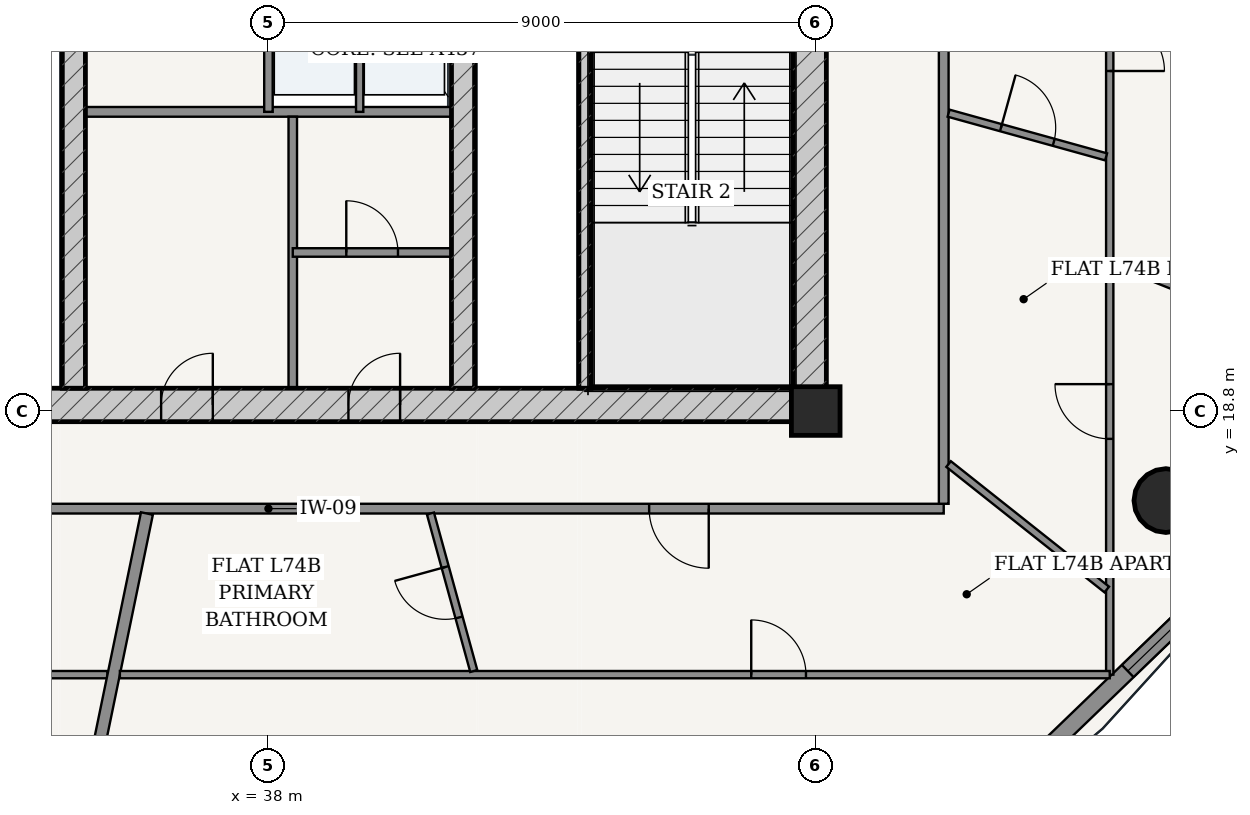
"""IFC4 building model, lengths in metres.
Left out: names, types, materials, properties, quantities, classifications, styles, units other than length and angle.
Written with IfcOpenShell. Run it as: python <this file> out.ifc"""

import sys

from ifc_helpers import new_model, si_unit, direction, frame, frame_2d, origin, origin_2d, place, context, subcontext, project, spatial, rectangle, hollow_circle, extrude, source, transform, mapped, element, fill, save


model = new_model("IFC4")
c1 = context("Model", 3, precision=1e-05, world=origin(), true_north=direction((-0.2419218956, 0.970295726276)))
c2 = subcontext(c1, "Body", "Model", "MODEL_VIEW")
j1 = project(units=[si_unit("LENGTHUNIT", "METRE"), si_unit("PLANEANGLEUNIT", "RADIAN")], contexts=[c1])
p1 = place(None, origin())
s1 = spatial("IfcSite", under=j1, at=p1, CompositionType="ELEMENT")
p2 = place(p1, origin())
s2 = spatial("IfcBuilding", under=s1, at=p2, CompositionType="ELEMENT")
p3 = place(p2, frame((0.0, 0.0, 281.95)))
s3 = spatial("IfcBuildingStorey", under=s2, at=p3, CompositionType="ELEMENT", Elevation=281.95)
p4 = place(p3, frame((47.0, 18.8, 0.0), z_axis=(0.0, 0.0, 1.0), x_axis=(1.0, 0.0, 0.0)))
e1 = element("IfcColumn", 1, at=p4, inside=s3, PredefinedType="COLUMN", context=c2, shape_type="SweptSolid", body=[
    extrude(rectangle(XDim=0.8, YDim=0.8, at=origin_2d()), origin(), (0.0, 0.0, 1.0), 3.75),
])
p5 = place(p3, frame((28.825, 18.9, 0.0), z_axis=(0.0, 0.0, 1.0), x_axis=(1.0, 0.0, 0.0)))
e2 = element("IfcWall", 2, at=p5, inside=s3, PredefinedType="SHEAR", context=c2, shape_type="SweptSolid", body=[
    extrude(rectangle(XDim=18.35, YDim=0.55, at=frame_2d((9.175, 0.0))), origin(), (0.0, 0.0, 1.0), 3.49),
])
p6 = place(p5, frame((7.41, 0.0, 0.0)))
e3 = element("IfcOpeningElement", 3, at=p6, cuts=e2, PredefinedType="OPENING", context=c2, shape_type="SweptSolid", body=[
    extrude(rectangle(XDim=0.85, YDim=2.1, at=frame_2d((0.425, 1.05))), frame((0.0, 0.285, 0.0), z_axis=(0.0, -1.0, 0.0), x_axis=(1.0, 0.0, 0.0)), (0.0, 0.0, 1.0), 0.57),
])
p7 = place(p5, frame((10.49, 0.0, 0.0)))
e4 = element("IfcOpeningElement", 4, at=p7, cuts=e2, PredefinedType="OPENING", context=c2, shape_type="SweptSolid", body=[
    extrude(rectangle(XDim=0.85, YDim=2.1, at=frame_2d((0.425, 1.05))), frame((0.0, 0.285, 0.0), z_axis=(0.0, -1.0, 0.0), x_axis=(1.0, 0.0, 0.0)), (0.0, 0.0, 1.0), 0.57),
])
p8 = place(p3, frame((46.9, 19.175, 0.0), z_axis=(0.0, 0.0, 1.0), x_axis=(0.0, 1.0, 0.0)))
e5 = element("IfcWall", 5, at=p8, inside=s3, PredefinedType="SHEAR", context=c2, shape_type="SweptSolid", body=[
    extrude(rectangle(XDim=15.25, YDim=0.55, at=frame_2d((7.625, 0.0))), origin(), (0.0, 0.0, 1.0), 3.49),
])
p9 = place(p8, frame((9.875, 0.0, 0.0)))
e6 = element("IfcOpeningElement", 6, at=p9, cuts=e5, PredefinedType="OPENING", context=c2, shape_type="SweptSolid", body=[
    extrude(rectangle(XDim=1.5, YDim=2.2, at=frame_2d((0.75, 1.1))), frame((0.0, 0.285, 0.0), z_axis=(0.0, -1.0, 0.0), x_axis=(1.0, 0.0, 0.0)), (0.0, 0.0, 1.0), 0.57),
])
p10 = place(p3, frame((43.205, 19.175, 0.0), z_axis=(0.0, 0.0, 1.0), x_axis=(0.0, 1.0, 0.0)))
e7 = element("IfcWall", 7, at=p10, inside=s3, PredefinedType="SOLIDWALL", context=c2, shape_type="SweptSolid", body=[
    extrude(rectangle(XDim=7.375, YDim=0.2, at=frame_2d((3.688, 0.0))), origin(), (0.0, 0.0, 1.0), 3.49),
])
p11 = place(p3, frame((34.8, 19.175, 0.0), z_axis=(0.0, 0.0, 1.0), x_axis=(0.0, 1.0, 0.0)))
e8 = element("IfcWall", 8, at=p11, inside=s3, PredefinedType="SHEAR", context=c2, shape_type="SweptSolid", body=[
    extrude(rectangle(XDim=15.25, YDim=0.38, at=frame_2d((7.625, 0.0))), origin(), (0.0, 0.0, 1.0), 3.49),
])
p12 = place(p11, frame((7.8, 0.0, 0.0)))
e9 = element("IfcOpeningElement", 9, at=p12, cuts=e8, PredefinedType="OPENING", context=c2, shape_type="SweptSolid", body=[
    extrude(rectangle(XDim=1.05, YDim=2.15, at=frame_2d((0.525, 1.075))), frame((0.0, 0.2, 0.0), z_axis=(0.0, -1.0, 0.0), x_axis=(1.0, 0.0, 0.0)), (0.0, 0.0, 1.0), 0.4),
])
p13 = place(p3, frame((41.2, 19.175, 0.0), z_axis=(0.0, 0.0, 1.0), x_axis=(0.0, 1.0, 0.0)))
e10 = element("IfcWall", 10, at=p13, inside=s3, PredefinedType="SHEAR", context=c2, shape_type="SweptSolid", body=[
    extrude(rectangle(XDim=15.25, YDim=0.38, at=frame_2d((7.625, 0.0))), origin(), (0.0, 0.0, 1.0), 3.49),
])
p14 = place(p13, frame((7.8, 0.0, 0.0)))
e11 = element("IfcOpeningElement", 11, at=p14, cuts=e10, PredefinedType="OPENING", context=c2, shape_type="SweptSolid", body=[
    extrude(rectangle(XDim=1.05, YDim=2.15, at=frame_2d((0.525, 1.075))), frame((0.0, 0.2, 0.0), z_axis=(0.0, -1.0, 0.0), x_axis=(1.0, 0.0, 0.0)), (0.0, 0.0, 1.0), 0.4),
])
p15 = place(p3, frame((52.759, 17.328, 0.0), z_axis=(0.0, 0.0, 1.0), x_axis=(1.0, 0.0, 0.0)))
e12 = element("IfcColumn", 12, at=p15, inside=s3, PredefinedType="COLUMN", context=c2, shape_type="SweptSolid", body=[
    extrude(hollow_circle(Radius=0.525, WallThickness=0.035, at=origin_2d()), origin(), (0.0, 0.0, 1.0), 3.75),
])
p16 = place(p3, frame((48.704, 11.221, 0.0), z_axis=(0.0, 0.0, 1.0), x_axis=(0.719995397366, 0.69397883813, 0.0)))
e13 = element("IfcWall", 13, at=p16, inside=s3, PredefinedType="SOLIDWALL", context=c2, shape_type="SweptSolid", body=[
    extrude(rectangle(XDim=7.582, YDim=0.28, at=frame_2d((3.791, 0.0))), origin(), (0.0, 0.0, 1.0), 3.49),
])
p17 = place(p16, frame((1.272, 0.0, 0.85)))
e14 = element("IfcOpeningElement", 14, at=p17, cuts=e13, PredefinedType="OPENING", context=c2, shape_type="SweptSolid", body=[
    extrude(rectangle(XDim=1.55, YDim=1.95, at=frame_2d((0.775, 0.975))), frame((0.0, 0.15, 0.0), z_axis=(0.0, -1.0, 0.0), x_axis=(1.0, 0.0, 0.0)), (0.0, 0.0, 1.0), 0.3),
])
p18 = place(p16, frame((4.76, 0.0, 0.85)))
e15 = element("IfcOpeningElement", 15, at=p18, cuts=e13, PredefinedType="OPENING", context=c2, shape_type="SweptSolid", body=[
    extrude(rectangle(XDim=1.55, YDim=1.95, at=frame_2d((0.775, 0.975))), frame((0.0, 0.15, 0.0), z_axis=(0.0, -1.0, 0.0), x_axis=(1.0, 0.0, 0.0)), (0.0, 0.0, 1.0), 0.3),
])
p19 = place(p3, frame((34.99, 23.72, 0.0), z_axis=(0.0, 0.0, 1.0), x_axis=(1.0, 0.0, 0.0)))
e16 = element("IfcWall", 16, at=p19, inside=s3, PredefinedType="PARTITIONING", context=c2, shape_type="SweptSolid", body=[
    extrude(rectangle(XDim=6.02, YDim=0.16, at=frame_2d((3.01, 0.0))), origin(), (0.0, 0.0, 1.0), 3.49),
])
p20 = place(p3, frame((38.0, 23.72, 0.0), z_axis=(0.0, 0.0, 1.0), x_axis=(0.0, 1.0, 0.0)))
e17 = element("IfcWall", 17, at=p20, inside=s3, PredefinedType="PARTITIONING", context=c2, shape_type="SweptSolid", body=[
    extrude(rectangle(XDim=2.56, YDim=0.14, at=frame_2d((1.28, 0.0))), origin(), (0.0, 0.0, 1.0), 3.49),
])
p21 = place(p3, frame((39.5, 23.72, 0.0), z_axis=(0.0, 0.0, 1.0), x_axis=(0.0, 1.0, 0.0)))
e18 = element("IfcWall", 18, at=p21, inside=s3, PredefinedType="PARTITIONING", context=c2, shape_type="SweptSolid", body=[
    extrude(rectangle(XDim=2.56, YDim=0.12, at=frame_2d((1.28, 0.0))), origin(), (0.0, 0.0, 1.0), 3.49),
])
p22 = place(p3, frame((38.4, 19.175, 0.0), z_axis=(0.0, 0.0, 1.0), x_axis=(0.0, 1.0, 0.0)))
e19 = element("IfcWall", 19, at=p22, inside=s3, PredefinedType="PARTITIONING", context=c2, shape_type="SweptSolid", body=[
    extrude(rectangle(XDim=4.465, YDim=0.14, at=frame_2d((2.232, 0.0))), origin(), (0.0, 0.0, 1.0), 3.49),
])
p23 = place(p3, frame((38.4, 21.407, 0.0), z_axis=(0.0, 0.0, 1.0), x_axis=(1.0, 0.0, 0.0)))
e20 = element("IfcWall", 20, at=p23, inside=s3, PredefinedType="PARTITIONING", context=c2, shape_type="SweptSolid", body=[
    extrude(rectangle(XDim=2.61, YDim=0.14, at=frame_2d((1.305, 0.0))), origin(), (0.0, 0.0, 1.0), 3.49),
])
p24 = place(p23, frame((0.88, 0.0, 0.0)))
e21 = element("IfcOpeningElement", 21, at=p24, cuts=e20, PredefinedType="OPENING", context=c2, shape_type="SweptSolid", body=[
    extrude(rectangle(XDim=0.85, YDim=2.1, at=frame_2d((0.425, 1.05))), frame((0.0, 0.08, 0.0), z_axis=(0.0, -1.0, 0.0), x_axis=(1.0, 0.0, 0.0)), (0.0, 0.0, 1.0), 0.16),
])
p25 = place(p3, frame((26.895, 17.195, 0.0), z_axis=(0.0, 0.0, 1.0), x_axis=(1.0, 0.0, 0.0)))
e22 = element("IfcWall", 22, at=p25, inside=s3, PredefinedType="PARTITIONING", context=c2, shape_type="SweptSolid", body=[
    extrude(rectangle(XDim=22.21, YDim=0.16, at=frame_2d((11.105, 0.0))), origin(), (0.0, 0.0, 1.0), 3.015),
])
p26 = place(p25, frame((17.365, 0.0, 0.0)))
e23 = element("IfcOpeningElement", 23, at=p26, cuts=e22, PredefinedType="OPENING", context=c2, shape_type="SweptSolid", body=[
    extrude(rectangle(XDim=0.98, YDim=2.2, at=frame_2d((0.49, 1.1))), frame((0.0, 0.09, 0.0), z_axis=(0.0, -1.0, 0.0), x_axis=(1.0, 0.0, 0.0)), (0.0, 0.0, 1.0), 0.18),
])
p27 = place(p3, frame((49.105, 17.275, 0.0), z_axis=(0.0, 0.0, 1.0), x_axis=(0.0, 1.0, 0.0)))
e24 = element("IfcWall", 24, at=p27, inside=s3, PredefinedType="PARTITIONING", context=c2, shape_type="SweptSolid", body=[
    extrude(rectangle(XDim=13.925, YDim=0.16, at=frame_2d((6.962, 0.0))), origin(), (0.0, 0.0, 1.0), 3.015),
])
p28 = place(p3, frame((35.353, 14.465, 0.0), z_axis=(0.0, 0.0, 1.0), x_axis=(-1.0, 0.0, 0.0)))
e25 = element("IfcWall", 25, at=p28, inside=s3, PredefinedType="PARTITIONING", context=c2, shape_type="SweptSolid", body=[
    extrude(rectangle(XDim=11.188, YDim=0.12, at=frame_2d((5.594, 0.0))), origin(), (0.0, 0.0, 1.0), 3.015),
])
p29 = place(p28, frame((3.997, 0.0, 0.0)))
e26 = element("IfcOpeningElement", 26, at=p29, cuts=e25, PredefinedType="OPENING", context=c2, shape_type="SweptSolid", body=[
    extrude(rectangle(XDim=0.9, YDim=2.15, at=frame_2d((0.45, 1.075))), frame((0.0, 0.07, 0.0), z_axis=(0.0, -1.0, 0.0), x_axis=(1.0, 0.0, 0.0)), (0.0, 0.0, 1.0), 0.14),
])
p30 = place(p3, frame((36.001, 17.115, 0.0), z_axis=(0.0, 0.0, 1.0), x_axis=(-0.202108543081, -0.979363128167, 0.0)))
e27 = element("IfcWall", 27, at=p30, inside=s3, PredefinedType="PARTITIONING", context=c2, shape_type="SweptSolid", body=[
    extrude(rectangle(XDim=8.739, YDim=0.2, at=frame_2d((4.369, 0.0))), origin(), (0.0, 0.0, 1.0), 3.015),
])
p31 = place(p3, frame((51.835, 34.01, 0.0), z_axis=(0.0, 0.0, 1.0), x_axis=(0.0, -1.0, 0.0)))
e28 = element("IfcWall", 28, at=p31, inside=s3, PredefinedType="PARTITIONING", context=c2, shape_type="SweptSolid", body=[
    extrude(rectangle(XDim=19.545, YDim=0.12, at=frame_2d((9.772, 0.0))), origin(), (0.0, 0.0, 1.0), 3.015),
])
p32 = place(p31, frame((14.768, 0.0, 0.0)))
e29 = element("IfcOpeningElement", 29, at=p32, cuts=e28, PredefinedType="OPENING", context=c2, shape_type="SweptSolid", body=[
    extrude(rectangle(XDim=0.9, YDim=2.15, at=frame_2d((0.45, 1.075))), frame((0.0, 0.07, 0.0), z_axis=(0.0, -1.0, 0.0), x_axis=(1.0, 0.0, 0.0)), (0.0, 0.0, 1.0), 0.14),
])
p33 = place(p31, frame((8.718, 0.0, 0.0)))
e30 = element("IfcOpeningElement", 30, at=p33, cuts=e28, PredefinedType="OPENING", context=c2, shape_type="SweptSolid", body=[
    extrude(rectangle(XDim=0.9, YDim=2.15, at=frame_2d((0.45, 1.075))), frame((0.0, 0.07, 0.0), z_axis=(0.0, -1.0, 0.0), x_axis=(1.0, 0.0, 0.0)), (0.0, 0.0, 1.0), 0.14),
])
p34 = place(p31, frame((4.14, 0.0, 0.0)))
e31 = element("IfcOpeningElement", 31, at=p34, cuts=e28, PredefinedType="OPENING", context=c2, shape_type="SweptSolid", body=[
    extrude(rectangle(XDim=0.9, YDim=2.15, at=frame_2d((0.45, 1.075))), frame((0.0, 0.07, 0.0), z_axis=(0.0, -1.0, 0.0), x_axis=(1.0, 0.0, 0.0)), (0.0, 0.0, 1.0), 0.14),
])
p35 = place(p3, frame((51.835, 14.465, 0.0), z_axis=(0.0, 0.0, 1.0), x_axis=(-1.0, 0.0, 0.0)))
e32 = element("IfcWall", 32, at=p35, inside=s3, PredefinedType="PARTITIONING", context=c2, shape_type="SweptSolid", body=[
    extrude(rectangle(XDim=16.278, YDim=0.12, at=frame_2d((8.139, 0.0))), origin(), (0.0, 0.0, 1.0), 3.015),
])
p36 = place(p35, frame((4.996, 0.0, 0.0)))
e33 = element("IfcOpeningElement", 33, at=p36, cuts=e32, PredefinedType="OPENING", context=c2, shape_type="SweptSolid", body=[
    extrude(rectangle(XDim=0.9, YDim=2.15, at=frame_2d((0.45, 1.075))), frame((0.0, 0.07, 0.0), z_axis=(0.0, -1.0, 0.0), x_axis=(1.0, 0.0, 0.0)), (0.0, 0.0, 1.0), 0.14),
])
p37 = place(p3, frame((51.893, 21.253, 0.0), z_axis=(0.0, 0.0, 1.0), x_axis=(0.928712556691, -0.370800467966, 0.0)))
e34 = element("IfcWall", 34, at=p37, inside=s3, PredefinedType="PARTITIONING", context=c2, shape_type="SweptSolid", body=[
    extrude(rectangle(XDim=4.28, YDim=0.12, at=frame_2d((2.14, 0.0))), origin(), (0.0, 0.0, 1.0), 3.121),
])
p38 = place(p3, frame((40.664, 17.115, 0.0), z_axis=(0.0, 0.0, 1.0), x_axis=(0.265177604745, -0.964199584081, 0.0)))
e35 = element("IfcWall", 35, at=p38, inside=s3, PredefinedType="PARTITIONING", context=c2, shape_type="SweptSolid", body=[
    extrude(rectangle(XDim=2.687, YDim=0.12, at=frame_2d((1.343, 0.0))), origin(), (0.0, 0.0, 1.0), 3.209),
])
p39 = place(p38, frame((0.913, 0.0, 0.0)))
e36 = element("IfcOpeningElement", 36, at=p39, cuts=e35, PredefinedType="OPENING", context=c2, shape_type="SweptSolid", body=[
    extrude(rectangle(XDim=0.86, YDim=2.15, at=frame_2d((0.43, 1.075))), frame((0.0, 0.07, 0.0), z_axis=(0.0, -1.0, 0.0), x_axis=(1.0, 0.0, 0.0)), (0.0, 0.0, 1.0), 0.14),
])
p40 = place(p3, frame((49.185, 17.928, 0.0), z_axis=(0.0, 0.0, 1.0), x_axis=(0.78348039615, -0.621416501912, 0.0)))
e37 = element("IfcWall", 37, at=p40, inside=s3, PredefinedType="PARTITIONING", context=c2, shape_type="SweptSolid", body=[
    extrude(rectangle(XDim=3.32, YDim=0.12, at=frame_2d((1.66, 0.0))), origin(), (0.0, 0.0, 1.0), 3.121),
])
p41 = place(p3, frame((49.185, 23.698, 0.0), z_axis=(0.0, 0.0, 1.0), x_axis=(0.963633636359, -0.267226897744, 0.0)))
e38 = element("IfcWall", 38, at=p41, inside=s3, PredefinedType="PARTITIONING", context=c2, shape_type="SweptSolid", body=[
    extrude(rectangle(XDim=2.688, YDim=0.12, at=frame_2d((1.344, 0.0))), origin(), (0.0, 0.0, 1.0), 3.209),
])
p42 = place(p41, frame((0.894, 0.0, 0.0)))
e39 = element("IfcOpeningElement", 39, at=p42, cuts=e38, PredefinedType="OPENING", context=c2, shape_type="SweptSolid", body=[
    extrude(rectangle(XDim=0.9, YDim=2.15, at=frame_2d((0.45, 1.075))), frame((0.0, 0.07, 0.0), z_axis=(0.0, -1.0, 0.0), x_axis=(1.0, 0.0, 0.0)), (0.0, 0.0, 1.0), 0.14),
])
m1 = source(origin(), c2, "Body", "SweptSolid", [
    extrude(rectangle(XDim=1.55, YDim=1.95, at=frame_2d((0.775, 0.975))), frame((0.0, 0.03, 0.0), z_axis=(0.0, -1.0, 0.0), x_axis=(1.0, 0.0, 0.0)), (0.0, 0.0, 1.0), 0.06),
])
p43 = place(p18, origin())
e40 = element("IfcWindow", 40, at=p43, inside=s3, PartitioningType="SINGLE_PANEL", PredefinedType="WINDOW", context=c2, shape_type="MappedRepresentation", body=[
    mapped(m1, transform((0.0, 0.0, 0.0), scale=1.0)),
])
fill(e15, e40)
m2 = source(origin(), c2, "Body", "SweptSolid", [
    extrude(rectangle(XDim=0.85, YDim=2.1, at=frame_2d((0.425, 1.05))), frame((0.0, 0.025, 0.0), z_axis=(0.0, -1.0, 0.0), x_axis=(1.0, 0.0, 0.0)), (0.0, 0.0, 1.0), 0.05),
])
p44 = place(p6, origin())
e41 = element("IfcDoor", 41, at=p44, inside=s3, OperationType="SINGLE_SWING_RIGHT", PredefinedType="DOOR", context=c2, shape_type="MappedRepresentation", body=[
    mapped(m2, transform((0.0, 0.0, 0.0), scale=1.0)),
])
fill(e3, e41)
p45 = place(p7, origin())
e42 = element("IfcDoor", 42, at=p45, inside=s3, OperationType="SINGLE_SWING_RIGHT", PredefinedType="DOOR", context=c2, shape_type="MappedRepresentation", body=[
    mapped(m2, transform((0.0, 0.0, 0.0), scale=1.0)),
])
fill(e4, e42)
p46 = place(p24, origin())
e43 = element("IfcDoor", 43, at=p46, inside=s3, OperationType="SINGLE_SWING_LEFT", PredefinedType="DOOR", context=c2, shape_type="MappedRepresentation", body=[
    mapped(m2, transform((0.0, 0.0, 0.0), scale=1.0)),
])
fill(e21, e43)
m3 = source(origin(), c2, "Body", "SweptSolid", [
    extrude(rectangle(XDim=0.98, YDim=2.2, at=frame_2d((0.49, 1.1))), frame((0.0, 0.025, 0.0), z_axis=(0.0, -1.0, 0.0), x_axis=(1.0, 0.0, 0.0)), (0.0, 0.0, 1.0), 0.05),
])
p47 = place(p26, frame((0.98, 0.0, 0.0), z_axis=(0.0, 0.0, 1.0), x_axis=(-1.0, 0.0, 0.0)))
e44 = element("IfcDoor", 44, at=p47, inside=s3, OperationType="SINGLE_SWING_LEFT", PredefinedType="DOOR", context=c2, shape_type="MappedRepresentation", body=[
    mapped(m3, transform((0.0, 0.0, 0.0), scale=1.0)),
])
fill(e23, e44)
m4 = source(origin(), c2, "Body", "SweptSolid", [
    extrude(rectangle(XDim=0.86, YDim=2.15, at=frame_2d((0.43, 1.075))), frame((0.0, 0.025, 0.0), z_axis=(0.0, -1.0, 0.0), x_axis=(1.0, 0.0, 0.0)), (0.0, 0.0, 1.0), 0.05),
])
p48 = place(p39, frame((0.86, 0.0, 0.0), z_axis=(0.0, 0.0, 1.0), x_axis=(-1.0, 0.0, 0.0)))
e45 = element("IfcDoor", 45, at=p48, inside=s3, OperationType="SINGLE_SWING_RIGHT", PredefinedType="DOOR", context=c2, shape_type="MappedRepresentation", body=[
    mapped(m4, transform((0.0, 0.0, 0.0), scale=1.0)),
])
fill(e36, e45)
m5 = source(origin(), c2, "Body", "SweptSolid", [
    extrude(rectangle(XDim=0.9, YDim=2.15, at=frame_2d((0.45, 1.075))), frame((0.0, 0.025, 0.0), z_axis=(0.0, -1.0, 0.0), x_axis=(1.0, 0.0, 0.0)), (0.0, 0.0, 1.0), 0.05),
])
p49 = place(p36, frame((0.9, 0.0, 0.0), z_axis=(0.0, 0.0, 1.0), x_axis=(-1.0, 0.0, 0.0)))
e46 = element("IfcDoor", 46, at=p49, inside=s3, OperationType="SINGLE_SWING_LEFT", PredefinedType="DOOR", context=c2, shape_type="MappedRepresentation", body=[
    mapped(m5, transform((0.0, 0.0, 0.0), scale=1.0)),
])
fill(e33, e46)
p50 = place(p32, frame((0.9, 0.0, 0.0), z_axis=(0.0, 0.0, 1.0), x_axis=(-1.0, 0.0, 0.0)))
e47 = element("IfcDoor", 47, at=p50, inside=s3, OperationType="SINGLE_SWING_RIGHT", PredefinedType="DOOR", context=c2, shape_type="MappedRepresentation", body=[
    mapped(m5, transform((0.0, 0.0, 0.0), scale=1.0)),
])
fill(e29, e47)
p51 = place(p42, origin())
e48 = element("IfcDoor", 48, at=p51, inside=s3, OperationType="SINGLE_SWING_LEFT", PredefinedType="DOOR", context=c2, shape_type="MappedRepresentation", body=[
    mapped(m5, transform((0.0, 0.0, 0.0), scale=1.0)),
])
fill(e39, e48)
p52 = place(p33, origin())
e49 = element("IfcDoor", 49, at=p52, inside=s3, OperationType="SINGLE_SWING_RIGHT", PredefinedType="DOOR", context=c2, shape_type="MappedRepresentation", body=[
    mapped(m5, transform((0.0, 0.0, 0.0), scale=1.0)),
])
fill(e30, e49)
save(model, sys.argv[1])
